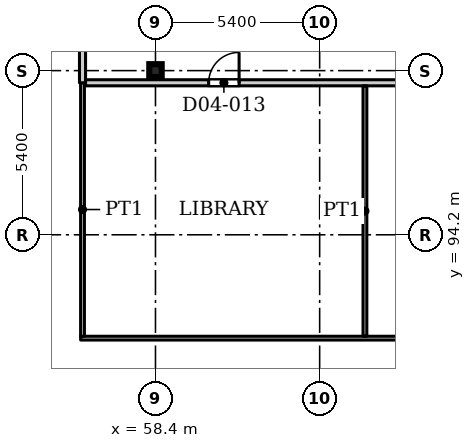
"""IFC4 building model, lengths in metres.
Left out: names, types, materials, properties, quantities, classifications, styles, units other than length and angle.
Written with IfcOpenShell. Run it as: python <this file> out.ifc"""

import sys

from ifc_helpers import new_model, si_unit, direction, frame, frame_2d, origin, origin_2d, place, context, subcontext, project, spatial, rectangle, i_section, extrude, source, transform, mapped, element, fill, save


model = new_model("IFC4")
c1 = context("Model", 3, precision=1e-05, world=origin(), true_north=direction((0.0, 1.0)))
c2 = subcontext(c1, "Body", "Model", "MODEL_VIEW")
j1 = project(units=[si_unit("LENGTHUNIT", "METRE"), si_unit("PLANEANGLEUNIT", "RADIAN")], contexts=[c1])
p1 = place(None, origin())
s1 = spatial("IfcSite", under=j1, at=p1, CompositionType="ELEMENT")
p2 = place(p1, origin())
s2 = spatial("IfcBuilding", under=s1, at=p2, CompositionType="ELEMENT")
p3 = place(p2, frame((0.0, 0.0, 21.5)))
s3 = spatial("IfcBuildingStorey", under=s2, at=p3, CompositionType="ELEMENT", Elevation=21.5)
p4 = place(p3, frame((58.4, 99.6, 0.0), z_axis=(0.0, 0.0, 1.0), x_axis=(1.0, 0.0, 0.0)))
e1 = element("IfcColumn", 1, at=p4, inside=s3, PredefinedType="COLUMN", context=c2, shape_type="SweptSolid", body=[
    extrude(i_section(OverallWidth=0.409, OverallDepth=0.425, WebThickness=0.033, FlangeThickness=0.052, FilletRadius=0.013, at=origin_2d()), origin(), (0.0, 0.0, 1.0), 4.5),
])
p5 = place(p3, frame((55.938, 90.8, 0.0), z_axis=(0.0, 0.0, 1.0), x_axis=(1.0, 0.0, 0.0)))
e2 = element("IfcWall", 2, at=p5, inside=s3, PredefinedType="PARTITIONING", context=c2, shape_type="SweptSolid", body=[
    extrude(rectangle(XDim=22.062, YDim=0.125, at=frame_2d((11.031, 0.0))), origin(), (0.0, 0.0, 1.0), 4.18),
])
p6 = place(p3, frame((56.0, 90.862, 0.0), z_axis=(0.0, 0.0, 1.0), x_axis=(0.0, 1.0, 0.0)))
e3 = element("IfcWall", 3, at=p6, inside=s3, PredefinedType="PARTITIONING", context=c2, shape_type="SweptSolid", body=[
    extrude(rectangle(XDim=8.338, YDim=0.125, at=frame_2d((4.169, 0.0))), origin(), (0.0, 0.0, 1.0), 4.18),
])
p7 = place(p3, frame((56.0, 99.2, 0.0), z_axis=(0.0, 0.0, 1.0), x_axis=(0.0, 1.0, 0.0)))
e4 = element("IfcWall", 4, at=p7, inside=s3, PredefinedType="PARTITIONING", context=c2, shape_type="SweptSolid", body=[
    extrude(rectangle(XDim=2.4, YDim=0.2, at=frame_2d((1.2, 0.0))), origin(), (0.0, 0.0, 1.0), 4.18),
])
p8 = place(p3, frame((56.1, 99.2, 0.0), z_axis=(0.0, 0.0, 1.0), x_axis=(1.0, 0.0, 0.0)))
e5 = element("IfcWall", 5, at=p8, inside=s3, PredefinedType="PARTITIONING", context=c2, shape_type="SweptSolid", body=[
    extrude(rectangle(XDim=67.5, YDim=0.2, at=frame_2d((33.75, 0.0))), origin(), (0.0, 0.0, 1.0), 4.18),
])
p9 = place(p8, frame((4.05, 0.0, 0.0)))
e6 = element("IfcOpeningElement", 6, at=p9, cuts=e5, PredefinedType="OPENING", context=c2, shape_type="SweptSolid", body=[
    extrude(rectangle(XDim=1.0, YDim=2.1, at=frame_2d((0.5, 1.05))), frame((0.0, 0.11, 0.0), z_axis=(0.0, -1.0, 0.0), x_axis=(1.0, 0.0, 0.0)), (0.0, 0.0, 1.0), 0.22),
])
p10 = place(p8, frame((65.554, 0.0, 0.0)))
e7 = element("IfcOpeningElement", 7, at=p10, cuts=e5, PredefinedType="OPENING", context=c2, shape_type="SweptSolid", body=[
    extrude(rectangle(XDim=1.0, YDim=2.1, at=frame_2d((0.5, 1.05))), frame((0.0, 0.11, 0.0), z_axis=(0.0, -1.0, 0.0), x_axis=(1.0, 0.0, 0.0)), (0.0, 0.0, 1.0), 0.22),
])
p11 = place(p8, frame((11.589, 0.0, 0.0)))
e8 = element("IfcOpeningElement", 8, at=p11, cuts=e5, PredefinedType="OPENING", context=c2, shape_type="SweptSolid", body=[
    extrude(rectangle(XDim=1.0, YDim=2.1, at=frame_2d((0.5, 1.05))), frame((0.0, 0.11, 0.0), z_axis=(0.0, -1.0, 0.0), x_axis=(1.0, 0.0, 0.0)), (0.0, 0.0, 1.0), 0.22),
])
p12 = place(p8, frame((20.329, 0.0, 0.0)))
e9 = element("IfcOpeningElement", 9, at=p12, cuts=e5, PredefinedType="OPENING", context=c2, shape_type="SweptSolid", body=[
    extrude(rectangle(XDim=1.0, YDim=2.1, at=frame_2d((0.5, 1.05))), frame((0.0, 0.11, 0.0), z_axis=(0.0, -1.0, 0.0), x_axis=(1.0, 0.0, 0.0)), (0.0, 0.0, 1.0), 0.22),
])
p13 = place(p8, frame((27.319, 0.0, 0.0)))
e10 = element("IfcOpeningElement", 10, at=p13, cuts=e5, PredefinedType="OPENING", context=c2, shape_type="SweptSolid", body=[
    extrude(rectangle(XDim=1.0, YDim=2.1, at=frame_2d((0.5, 1.05))), frame((0.0, 0.11, 0.0), z_axis=(0.0, -1.0, 0.0), x_axis=(1.0, 0.0, 0.0)), (0.0, 0.0, 1.0), 0.22),
])
p14 = place(p8, frame((33.262, 0.0, 0.0)))
e11 = element("IfcOpeningElement", 11, at=p14, cuts=e5, PredefinedType="OPENING", context=c2, shape_type="SweptSolid", body=[
    extrude(rectangle(XDim=1.0, YDim=2.1, at=frame_2d((0.5, 1.05))), frame((0.0, 0.11, 0.0), z_axis=(0.0, -1.0, 0.0), x_axis=(1.0, 0.0, 0.0)), (0.0, 0.0, 1.0), 0.22),
])
p15 = place(p8, frame((42.002, 0.0, 0.0)))
e12 = element("IfcOpeningElement", 12, at=p15, cuts=e5, PredefinedType="OPENING", context=c2, shape_type="SweptSolid", body=[
    extrude(rectangle(XDim=1.0, YDim=2.1, at=frame_2d((0.5, 1.05))), frame((0.0, 0.11, 0.0), z_axis=(0.0, -1.0, 0.0), x_axis=(1.0, 0.0, 0.0)), (0.0, 0.0, 1.0), 0.22),
])
p16 = place(p8, frame((49.743, 0.0, 0.0)))
e13 = element("IfcOpeningElement", 13, at=p16, cuts=e5, PredefinedType="OPENING", context=c2, shape_type="SweptSolid", body=[
    extrude(rectangle(XDim=1.0, YDim=2.1, at=frame_2d((0.5, 1.05))), frame((0.0, 0.11, 0.0), z_axis=(0.0, -1.0, 0.0), x_axis=(1.0, 0.0, 0.0)), (0.0, 0.0, 1.0), 0.22),
])
p17 = place(p8, frame((56.733, 0.0, 0.0)))
e14 = element("IfcOpeningElement", 14, at=p17, cuts=e5, PredefinedType="OPENING", context=c2, shape_type="SweptSolid", body=[
    extrude(rectangle(XDim=1.0, YDim=2.1, at=frame_2d((0.5, 1.05))), frame((0.0, 0.11, 0.0), z_axis=(0.0, -1.0, 0.0), x_axis=(1.0, 0.0, 0.0)), (0.0, 0.0, 1.0), 0.22),
])
p18 = place(p8, frame((61.394, 0.0, 0.0)))
e15 = element("IfcOpeningElement", 15, at=p18, cuts=e5, PredefinedType="OPENING", context=c2, shape_type="SweptSolid", body=[
    extrude(rectangle(XDim=1.0, YDim=2.1, at=frame_2d((0.5, 1.05))), frame((0.0, 0.11, 0.0), z_axis=(0.0, -1.0, 0.0), x_axis=(1.0, 0.0, 0.0)), (0.0, 0.0, 1.0), 0.22),
])
p19 = place(p3, frame((65.289, 90.862, 0.0), z_axis=(0.0, 0.0, 1.0), x_axis=(0.0, 1.0, 0.0)))
e16 = element("IfcWall", 16, at=p19, inside=s3, PredefinedType="PARTITIONING", context=c2, shape_type="SweptSolid", body=[
    extrude(rectangle(XDim=8.238, YDim=0.125, at=frame_2d((4.119, 0.0))), origin(), (0.0, 0.0, 1.0), 4.18),
])
m1 = source(origin(), c2, "Body", "SweptSolid", [
    extrude(rectangle(XDim=1.0, YDim=2.1, at=frame_2d((0.5, 1.05))), frame((0.0, 0.025, 0.0), z_axis=(0.0, -1.0, 0.0), x_axis=(1.0, 0.0, 0.0)), (0.0, 0.0, 1.0), 0.05),
])
p20 = place(p9, origin())
e17 = element("IfcDoor", 17, at=p20, inside=s3, OperationType="SINGLE_SWING_LEFT", PredefinedType="DOOR", context=c2, shape_type="MappedRepresentation", body=[
    mapped(m1, transform((0.0, 0.0, 0.0), x_axis=(1.0, 0.0, 0.0), y_axis=(0.0, 1.0, 0.0), z_axis=(0.0, 0.0, 1.0), scale=1.0)),
])
fill(e6, e17)
save(model, sys.argv[1])
